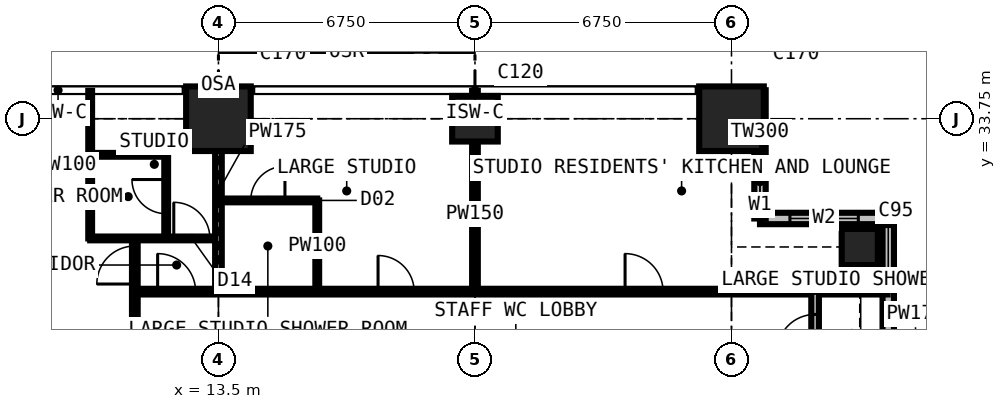
"""IFC4 building model, lengths in metres.
Left out: names, types, materials, properties, quantities, classifications, styles, units other than length and angle.
Written with IfcOpenShell. Run it as: python <this file> out.ifc"""

import sys

from ifc_helpers import new_model, si_unit, direction, frame, frame_2d, origin, origin_2d, place, context, subcontext, project, spatial, rectangle, extrude, element, fill, save


model = new_model("IFC4")
c1 = context("Model", 3, precision=1e-05, world=origin(), true_north=direction((0.0, 1.0)))
c2 = subcontext(c1, "Body", "Model", "MODEL_VIEW")
j1 = project(units=[si_unit("LENGTHUNIT", "METRE"), si_unit("PLANEANGLEUNIT", "RADIAN")], contexts=[c1])
p1 = place(None, origin())
s1 = spatial("IfcSite", under=j1, at=p1, CompositionType="ELEMENT")
p2 = place(p1, origin())
s2 = spatial("IfcBuilding", under=s1, at=p2, CompositionType="ELEMENT")
p3 = place(p2, frame((0.0, 0.0, 196.2)))
s3 = spatial("IfcBuildingStorey", under=s2, at=p3, CompositionType="ELEMENT", Elevation=196.2)
p4 = place(p3, frame((13.5, 33.75, 0.0), z_axis=(0.0, 0.0, 1.0), x_axis=(1.0, 0.0, 0.0)))
e1 = element("IfcColumn", 1, at=p4, inside=s3, PredefinedType="COLUMN", context=c2, shape_type="SweptSolid", body=[
    extrude(rectangle(XDim=1.7, YDim=1.7, at=origin_2d()), origin(), (0.0, 0.0, 1.0), 3.6),
])
p5 = place(p3, frame((20.25, 33.75, 0.0), z_axis=(0.0, 0.0, 1.0), x_axis=(1.0, 0.0, 0.0)))
e2 = element("IfcColumn", 2, at=p5, inside=s3, PredefinedType="COLUMN", context=c2, shape_type="SweptSolid", body=[
    extrude(rectangle(XDim=1.2, YDim=1.2, at=origin_2d()), origin(), (0.0, 0.0, 1.0), 3.6),
])
p6 = place(p3, frame((27.0, 33.75, 0.0), z_axis=(0.0, 0.0, 1.0), x_axis=(1.0, 0.0, 0.0)))
e3 = element("IfcColumn", 3, at=p6, inside=s3, PredefinedType="COLUMN", context=c2, shape_type="SweptSolid", body=[
    extrude(rectangle(XDim=1.7, YDim=1.7, at=origin_2d()), origin(), (0.0, 0.0, 1.0), 3.6),
])
p7 = place(p3, frame((30.375, 30.375, 0.0), z_axis=(0.0, 0.0, 1.0), x_axis=(1.0, 0.0, 0.0)))
e4 = element("IfcColumn", 4, at=p7, inside=s3, PredefinedType="COLUMN", context=c2, shape_type="SweptSolid", body=[
    extrude(rectangle(XDim=0.95, YDim=0.95, at=origin_2d()), origin(), (0.0, 0.0, 1.0), 3.6),
])
p8 = place(p3, frame((31.125, 27.75, 0.0), z_axis=(0.0, 0.0, 1.0), x_axis=(0.0, 1.0, 0.0)))
e5 = element("IfcWall", 5, at=p8, inside=s3, PredefinedType="SOLIDWALL", context=c2, shape_type="SweptSolid", body=[
    extrude(rectangle(XDim=3.375, YDim=0.3, at=frame_2d((1.688, 0.0))), origin(), (0.0, 0.0, 1.0), 3.3),
])
p9 = place(p8, frame((1.663, 0.0, 0.9)))
e6 = element("IfcOpeningElement", 6, at=p9, cuts=e5, PredefinedType="OPENING", context=c2, shape_type="SweptSolid", body=[
    extrude(rectangle(XDim=1.5, YDim=1.8, at=frame_2d((0.75, 0.9))), frame((0.0, 0.16, 0.0), z_axis=(0.0, -1.0, 0.0), x_axis=(1.0, 0.0, 0.0)), (0.0, 0.0, 1.0), 0.32),
])
p10 = place(p3, frame((31.125, 31.125, 0.0), z_axis=(0.0, 0.0, 1.0), x_axis=(-1.0, 0.0, 0.0)))
e7 = element("IfcWall", 7, at=p10, inside=s3, PredefinedType="SOLIDWALL", context=c2, shape_type="SweptSolid", body=[
    extrude(rectangle(XDim=3.375, YDim=0.3, at=frame_2d((1.688, 0.0))), origin(), (0.0, 0.0, 1.0), 3.3),
])
p11 = place(p10, frame((0.788, 0.0, 0.6)))
e8 = element("IfcOpeningElement", 8, at=p11, cuts=e7, PredefinedType="OPENING", context=c2, shape_type="SweptSolid", body=[
    extrude(rectangle(XDim=1.8, YDim=2.1, at=frame_2d((0.9, 1.05))), frame((0.0, 0.16, 0.0), z_axis=(0.0, -1.0, 0.0), x_axis=(1.0, 0.0, 0.0)), (0.0, 0.0, 1.0), 0.32),
])
p12 = place(p3, frame((27.75, 31.125, 0.0), z_axis=(0.0, 0.0, 1.0), x_axis=(0.0, 1.0, 0.0)))
e9 = element("IfcWall", 9, at=p12, inside=s3, PredefinedType="SOLIDWALL", context=c2, shape_type="SweptSolid", body=[
    extrude(rectangle(XDim=3.375, YDim=0.3, at=frame_2d((1.688, 0.0))), origin(), (0.0, 0.0, 1.0), 3.3),
])
p13 = place(p12, frame((0.218, 0.0, 0.9)))
e10 = element("IfcOpeningElement", 10, at=p13, cuts=e9, PredefinedType="OPENING", context=c2, shape_type="SweptSolid", body=[
    extrude(rectangle(XDim=1.5, YDim=1.8, at=frame_2d((0.75, 0.9))), frame((0.0, 0.16, 0.0), z_axis=(0.0, -1.0, 0.0), x_axis=(1.0, 0.0, 0.0)), (0.0, 0.0, 1.0), 0.32),
])
p14 = place(p3, frame((10.125, 30.6, 0.0), z_axis=(0.0, 0.0, 1.0), x_axis=(0.0, 1.0, 0.0)))
e11 = element("IfcWall", 11, at=p14, inside=s3, PredefinedType="PARTITIONING", context=c2, shape_type="SweptSolid", body=[
    extrude(rectangle(XDim=3.884, YDim=0.1, at=frame_2d((1.942, 0.0))), origin(), (0.0, 0.0, 1.0), 3.3),
])
p15 = place(p3, frame((10.125, 30.6, 0.0), z_axis=(0.0, 0.0, 1.0), x_axis=(1.0, 0.0, 0.0)))
e12 = element("IfcWall", 12, at=p15, inside=s3, PredefinedType="PARTITIONING", context=c2, shape_type="SweptSolid", body=[
    extrude(rectangle(XDim=3.375, YDim=0.1, at=frame_2d((1.688, 0.0))), origin(), (0.0, 0.0, 1.0), 3.3),
])
p16 = place(p15, frame((2.2, 0.0, 0.0)))
e13 = element("IfcOpeningElement", 13, at=p16, cuts=e12, PredefinedType="OPENING", context=c2, shape_type="SweptSolid", body=[
    extrude(rectangle(XDim=0.95, YDim=2.2, at=frame_2d((0.475, 1.1))), frame((0.0, 0.06, 0.0), z_axis=(0.0, -1.0, 0.0), x_axis=(1.0, 0.0, 0.0)), (0.0, 0.0, 1.0), 0.12),
])
p17 = place(p3, frame((10.125, 32.8, 0.0), z_axis=(0.0, 0.0, 1.0), x_axis=(1.0, 0.0, 0.0)))
e14 = element("IfcWall", 14, at=p17, inside=s3, PredefinedType="PARTITIONING", context=c2, shape_type="SweptSolid", body=[
    extrude(rectangle(XDim=2.0, YDim=0.1, at=frame_2d((1.0, 0.0))), origin(), (0.0, 0.0, 1.0), 3.3),
])
p18 = place(p3, frame((11.3, 11.3, 0.0), z_axis=(0.0, 0.0, 1.0), x_axis=(0.0, 1.0, 0.0)))
e15 = element("IfcWall", 15, at=p18, inside=s3, PredefinedType="PARTITIONING", context=c2, shape_type="SweptSolid", body=[
    extrude(rectangle(XDim=19.3, YDim=0.15, at=frame_2d((9.65, 0.0))), origin(), (0.0, 0.0, 1.0), 3.3),
])
p19 = place(p18, frame((18.1, 0.0, 0.0)))
e16 = element("IfcOpeningElement", 16, at=p19, cuts=e15, PredefinedType="OPENING", context=c2, shape_type="SweptSolid", body=[
    extrude(rectangle(XDim=1.0, YDim=2.2, at=frame_2d((0.5, 1.1))), frame((0.0, 0.085, 0.0), z_axis=(0.0, -1.0, 0.0), x_axis=(1.0, 0.0, 0.0)), (0.0, 0.0, 1.0), 0.17),
])
p20 = place(p18, frame((10.137, 0.0, 0.0)))
e17 = element("IfcOpeningElement", 17, at=p20, cuts=e15, PredefinedType="OPENING", context=c2, shape_type="SweptSolid", body=[
    extrude(rectangle(XDim=1.0, YDim=2.2, at=frame_2d((0.5, 1.1))), frame((0.0, 0.085, 0.0), z_axis=(0.0, -1.0, 0.0), x_axis=(1.0, 0.0, 0.0)), (0.0, 0.0, 1.0), 0.17),
])
p21 = place(p3, frame((11.3, 29.2, 0.0), z_axis=(0.0, 0.0, 1.0), x_axis=(1.0, 0.0, 0.0)))
e18 = element("IfcWall", 18, at=p21, inside=s3, PredefinedType="PARTITIONING", context=c2, shape_type="SweptSolid", body=[
    extrude(rectangle(XDim=19.809, YDim=0.15, at=frame_2d((9.904, 0.0))), origin(), (0.0, 0.0, 1.0), 3.3),
])
p22 = place(p21, frame((12.9, 0.0, 0.0)))
e19 = element("IfcOpeningElement", 19, at=p22, cuts=e18, PredefinedType="OPENING", context=c2, shape_type="SweptSolid", body=[
    extrude(rectangle(XDim=1.0, YDim=2.2, at=frame_2d((0.5, 1.1))), frame((0.0, 0.085, 0.0), z_axis=(0.0, -1.0, 0.0), x_axis=(1.0, 0.0, 0.0)), (0.0, 0.0, 1.0), 0.17),
])
p23 = place(p21, frame((6.4, 0.0, 0.0)))
e20 = element("IfcOpeningElement", 20, at=p23, cuts=e18, PredefinedType="OPENING", context=c2, shape_type="SweptSolid", body=[
    extrude(rectangle(XDim=0.95, YDim=2.2, at=frame_2d((0.475, 1.1))), frame((0.0, 0.085, 0.0), z_axis=(0.0, -1.0, 0.0), x_axis=(1.0, 0.0, 0.0)), (0.0, 0.0, 1.0), 0.17),
])
p24 = place(p21, frame((0.6, 0.0, 0.0)))
e21 = element("IfcOpeningElement", 21, at=p24, cuts=e18, PredefinedType="OPENING", context=c2, shape_type="SweptSolid", body=[
    extrude(rectangle(XDim=1.0, YDim=2.2, at=frame_2d((0.5, 1.1))), frame((0.0, 0.085, 0.0), z_axis=(0.0, -1.0, 0.0), x_axis=(1.0, 0.0, 0.0)), (0.0, 0.0, 1.0), 0.17),
])
p25 = place(p3, frame((12.125, 30.6, 0.0), z_axis=(0.0, 0.0, 1.0), x_axis=(0.0, 1.0, 0.0)))
e22 = element("IfcWall", 22, at=p25, inside=s3, PredefinedType="PARTITIONING", context=c2, shape_type="SweptSolid", body=[
    extrude(rectangle(XDim=2.2, YDim=0.1, at=frame_2d((1.1, 0.0))), origin(), (0.0, 0.0, 1.0), 3.3),
])
p26 = place(p25, frame((0.65, 0.0, 0.0)))
e23 = element("IfcOpeningElement", 23, at=p26, cuts=e22, PredefinedType="OPENING", context=c2, shape_type="SweptSolid", body=[
    extrude(rectangle(XDim=0.9, YDim=2.2, at=frame_2d((0.45, 1.1))), frame((0.0, 0.06, 0.0), z_axis=(0.0, -1.0, 0.0), x_axis=(1.0, 0.0, 0.0)), (0.0, 0.0, 1.0), 0.12),
])
p27 = place(p3, frame((13.5, 29.2, 0.0), z_axis=(0.0, 0.0, 1.0), x_axis=(0.0, 1.0, 0.0)))
e24 = element("IfcWall", 24, at=p27, inside=s3, PredefinedType="PARTITIONING", context=c2, shape_type="SweptSolid", body=[
    extrude(rectangle(XDim=5.284, YDim=0.175, at=frame_2d((2.642, 0.0))), origin(), (0.0, 0.0, 1.0), 2.802),
])
p28 = place(p3, frame((13.5, 31.6, 0.0), z_axis=(0.0, 0.0, 1.0), x_axis=(1.0, 0.0, 0.0)))
e25 = element("IfcWall", 25, at=p28, inside=s3, PredefinedType="PARTITIONING", context=c2, shape_type="SweptSolid", body=[
    extrude(rectangle(XDim=2.6, YDim=0.1, at=frame_2d((1.3, 0.0))), origin(), (0.0, 0.0, 1.0), 3.3),
])
p29 = place(p28, frame((0.85, 0.0, 0.0)))
e26 = element("IfcOpeningElement", 26, at=p29, cuts=e25, PredefinedType="OPENING", context=c2, shape_type="SweptSolid", body=[
    extrude(rectangle(XDim=0.9, YDim=2.2, at=frame_2d((0.45, 1.1))), frame((0.0, 0.06, 0.0), z_axis=(0.0, -1.0, 0.0), x_axis=(1.0, 0.0, 0.0)), (0.0, 0.0, 1.0), 0.12),
])
p30 = place(p3, frame((16.1, 29.2, 0.0), z_axis=(0.0, 0.0, 1.0), x_axis=(0.0, 1.0, 0.0)))
e27 = element("IfcWall", 27, at=p30, inside=s3, PredefinedType="PARTITIONING", context=c2, shape_type="SweptSolid", body=[
    extrude(rectangle(XDim=2.4, YDim=0.1, at=frame_2d((1.2, 0.0))), origin(), (0.0, 0.0, 1.0), 3.3),
])
p31 = place(p3, frame((20.25, 29.2, 0.0), z_axis=(0.0, 0.0, 1.0), x_axis=(0.0, 1.0, 0.0)))
e28 = element("IfcWall", 28, at=p31, inside=s3, PredefinedType="PARTITIONING", context=c2, shape_type="SweptSolid", body=[
    extrude(rectangle(XDim=5.284, YDim=0.15, at=frame_2d((2.642, 0.0))), origin(), (0.0, 0.0, 1.0), 2.802),
])
p32 = place(p3, frame((29.2, 13.5, 0.0), z_axis=(0.0, 0.0, 1.0), x_axis=(0.0, 1.0, 0.0)))
e29 = element("IfcWall", 29, at=p32, inside=s3, PredefinedType="PARTITIONING", context=c2, shape_type="SweptSolid", body=[
    extrude(rectangle(XDim=15.7, YDim=0.2, at=frame_2d((7.85, 0.0))), origin(), (0.0, 0.0, 1.0), 3.3),
])
p33 = place(p32, frame((8.35, 0.0, 0.0)))
e30 = element("IfcOpeningElement", 30, at=p33, cuts=e29, PredefinedType="OPENING", context=c2, shape_type="SweptSolid", body=[
    extrude(rectangle(XDim=0.95, YDim=2.2, at=frame_2d((0.475, 1.1))), frame((0.0, 0.11, 0.0), z_axis=(0.0, -1.0, 0.0), x_axis=(1.0, 0.0, 0.0)), (0.0, 0.0, 1.0), 0.22),
])
p34 = place(p32, frame((1.6, 0.0, 0.0)))
e31 = element("IfcOpeningElement", 31, at=p34, cuts=e29, PredefinedType="OPENING", context=c2, shape_type="SweptSolid", body=[
    extrude(rectangle(XDim=0.95, YDim=2.2, at=frame_2d((0.475, 1.1))), frame((0.0, 0.11, 0.0), z_axis=(0.0, -1.0, 0.0), x_axis=(1.0, 0.0, 0.0)), (0.0, 0.0, 1.0), 0.22),
])
p35 = place(p32, frame((14.1, 0.0, 0.0)))
e32 = element("IfcOpeningElement", 32, at=p35, cuts=e29, PredefinedType="OPENING", context=c2, shape_type="SweptSolid", body=[
    extrude(rectangle(XDim=1.0, YDim=2.2, at=frame_2d((0.5, 1.1))), frame((0.0, 0.11, 0.0), z_axis=(0.0, -1.0, 0.0), x_axis=(1.0, 0.0, 0.0)), (0.0, 0.0, 1.0), 0.22),
])
p36 = place(p9, origin())
e33 = element("IfcWindow", 33, at=p36, inside=s3, PartitioningType="SINGLE_PANEL", PredefinedType="WINDOW", context=c2, shape_type="SweptSolid", body=[
    extrude(rectangle(XDim=1.5, YDim=1.8, at=frame_2d((0.75, 0.9))), frame((0.0, 0.03, 0.0), z_axis=(0.0, -1.0, 0.0), x_axis=(1.0, 0.0, 0.0)), (0.0, 0.0, 1.0), 0.06),
])
fill(e6, e33)
p37 = place(p11, origin())
e34 = element("IfcWindow", 34, at=p37, inside=s3, PartitioningType="SINGLE_PANEL", PredefinedType="WINDOW", context=c2, shape_type="SweptSolid", body=[
    extrude(rectangle(XDim=1.8, YDim=2.1, at=frame_2d((0.9, 1.05))), frame((0.0, 0.03, 0.0), z_axis=(0.0, -1.0, 0.0), x_axis=(1.0, 0.0, 0.0)), (0.0, 0.0, 1.0), 0.06),
])
fill(e8, e34)
p38 = place(p13, origin())
e35 = element("IfcWindow", 35, at=p38, inside=s3, PartitioningType="SINGLE_PANEL", PredefinedType="WINDOW", context=c2, shape_type="SweptSolid", body=[
    extrude(rectangle(XDim=1.5, YDim=1.8, at=frame_2d((0.75, 0.9))), frame((0.0, 0.03, 0.0), z_axis=(0.0, -1.0, 0.0), x_axis=(1.0, 0.0, 0.0)), (0.0, 0.0, 1.0), 0.06),
])
fill(e10, e35)
p39 = place(p35, origin())
e36 = element("IfcDoor", 36, at=p39, inside=s3, OperationType="SINGLE_SWING_LEFT", PredefinedType="DOOR", context=c2, shape_type="SweptSolid", body=[
    extrude(rectangle(XDim=1.0, YDim=2.2, at=frame_2d((0.5, 1.1))), frame((0.0, 0.025, 0.0), z_axis=(0.0, -1.0, 0.0), x_axis=(1.0, 0.0, 0.0)), (0.0, 0.0, 1.0), 0.05),
])
fill(e32, e36)
p40 = place(p22, origin())
e37 = element("IfcDoor", 37, at=p40, inside=s3, OperationType="SINGLE_SWING_LEFT", PredefinedType="DOOR", context=c2, shape_type="SweptSolid", body=[
    extrude(rectangle(XDim=1.0, YDim=2.2, at=frame_2d((0.5, 1.1))), frame((0.0, 0.025, 0.0), z_axis=(0.0, -1.0, 0.0), x_axis=(1.0, 0.0, 0.0)), (0.0, 0.0, 1.0), 0.05),
])
fill(e19, e37)
p41 = place(p23, origin())
e38 = element("IfcDoor", 38, at=p41, inside=s3, OperationType="SINGLE_SWING_LEFT", PredefinedType="DOOR", context=c2, shape_type="SweptSolid", body=[
    extrude(rectangle(XDim=0.95, YDim=2.2, at=frame_2d((0.475, 1.1))), frame((0.0, 0.025, 0.0), z_axis=(0.0, -1.0, 0.0), x_axis=(1.0, 0.0, 0.0)), (0.0, 0.0, 1.0), 0.05),
])
fill(e20, e38)
p42 = place(p29, origin())
e39 = element("IfcDoor", 39, at=p42, inside=s3, OperationType="SINGLE_SWING_RIGHT", PredefinedType="DOOR", context=c2, shape_type="SweptSolid", body=[
    extrude(rectangle(XDim=0.9, YDim=2.2, at=frame_2d((0.45, 1.1))), frame((0.0, 0.025, 0.0), z_axis=(0.0, -1.0, 0.0), x_axis=(1.0, 0.0, 0.0)), (0.0, 0.0, 1.0), 0.05),
])
fill(e26, e39)
p43 = place(p16, origin())
e40 = element("IfcDoor", 40, at=p43, inside=s3, OperationType="SINGLE_SWING_LEFT", PredefinedType="DOOR", context=c2, shape_type="SweptSolid", body=[
    extrude(rectangle(XDim=0.95, YDim=2.2, at=frame_2d((0.475, 1.1))), frame((0.0, 0.025, 0.0), z_axis=(0.0, -1.0, 0.0), x_axis=(1.0, 0.0, 0.0)), (0.0, 0.0, 1.0), 0.05),
])
fill(e13, e40)
p44 = place(p26, origin())
e41 = element("IfcDoor", 41, at=p44, inside=s3, OperationType="SINGLE_SWING_RIGHT", PredefinedType="DOOR", context=c2, shape_type="SweptSolid", body=[
    extrude(rectangle(XDim=0.9, YDim=2.2, at=frame_2d((0.45, 1.1))), frame((0.0, 0.025, 0.0), z_axis=(0.0, -1.0, 0.0), x_axis=(1.0, 0.0, 0.0)), (0.0, 0.0, 1.0), 0.05),
])
fill(e23, e41)
p45 = place(p24, origin())
e42 = element("IfcDoor", 42, at=p45, inside=s3, OperationType="SINGLE_SWING_LEFT", PredefinedType="DOOR", context=c2, shape_type="SweptSolid", body=[
    extrude(rectangle(XDim=1.0, YDim=2.2, at=frame_2d((0.5, 1.1))), frame((0.0, 0.025, 0.0), z_axis=(0.0, -1.0, 0.0), x_axis=(1.0, 0.0, 0.0)), (0.0, 0.0, 1.0), 0.05),
])
fill(e21, e42)
p46 = place(p19, origin())
e43 = element("IfcDoor", 43, at=p46, inside=s3, OperationType="SINGLE_SWING_LEFT", PredefinedType="DOOR", context=c2, shape_type="SweptSolid", body=[
    extrude(rectangle(XDim=1.0, YDim=2.2, at=frame_2d((0.5, 1.1))), frame((0.0, 0.025, 0.0), z_axis=(0.0, -1.0, 0.0), x_axis=(1.0, 0.0, 0.0)), (0.0, 0.0, 1.0), 0.05),
])
fill(e16, e43)
save(model, sys.argv[1])
